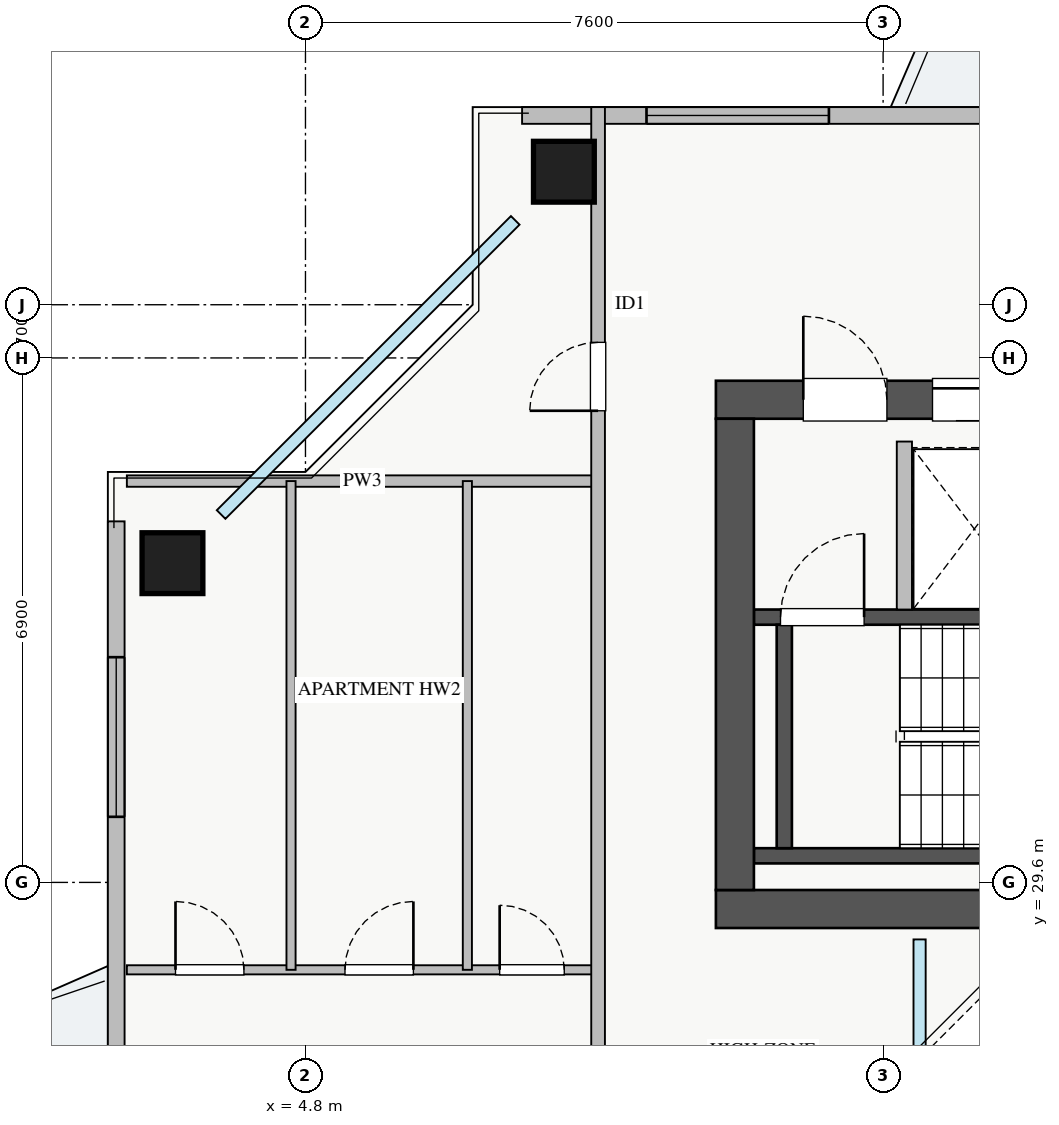
"""IFC4 building model, lengths in metres.
Left out: names, types, materials, properties, quantities, classifications, styles, units other than length and angle.
Written with IfcOpenShell. Run it as: python <this file> out.ifc"""

import sys

from ifc_helpers import new_model, si_unit, direction, frame, frame_2d, origin, origin_2d, place, context, subcontext, project, spatial, rectangle, extrude, source, transform, mapped, element, fill, save


model = new_model("IFC4")
c1 = context("Model", 3, precision=1e-05, world=origin(), true_north=direction((0.0, 1.0)))
c2 = subcontext(c1, "Body", "Model", "MODEL_VIEW")
j1 = project(units=[si_unit("LENGTHUNIT", "METRE"), si_unit("PLANEANGLEUNIT", "RADIAN")], contexts=[c1])
p1 = place(None, origin())
s1 = spatial("IfcSite", under=j1, at=p1, CompositionType="ELEMENT")
p2 = place(p1, origin())
s2 = spatial("IfcBuilding", under=s1, at=p2, CompositionType="ELEMENT")
p3 = place(p2, frame((0.0, 0.0, 190.5)))
s3 = spatial("IfcBuildingStorey", under=s2, at=p3, CompositionType="ELEMENT", Elevation=190.5)
p4 = place(p3, frame((12.68, 33.2, 0.0), z_axis=(0.0, 0.0, 1.0), x_axis=(1.0, 0.0, 0.0)))
e1 = element("IfcWall", 1, at=p4, inside=s3, PredefinedType="SHEAR", context=c2, shape_type="SweptSolid", body=[
    extrude(rectangle(XDim=1.94, YDim=0.18, at=frame_2d((0.97, 0.0))), origin(), (0.0, 0.0, 1.0), 3.07),
])
p5 = place(p3, frame((10.7, 29.95, 0.0), z_axis=(0.0, 0.0, 1.0), x_axis=(1.0, 0.0, 0.0)))
e2 = element("IfcWall", 2, at=p5, inside=s3, PredefinedType="SHEAR", context=c2, shape_type="SweptSolid", body=[
    extrude(rectangle(XDim=7.45, YDim=0.2, at=frame_2d((3.725, 0.0))), origin(), (0.0, 0.0, 1.0), 3.25),
])
p6 = place(p3, frame((10.7, 33.09, 0.0), z_axis=(0.0, 0.0, 1.0), x_axis=(1.0, 0.0, 0.0)))
e3 = element("IfcWall", 3, at=p6, inside=s3, PredefinedType="SHEAR", context=c2, shape_type="SweptSolid", body=[
    extrude(rectangle(XDim=7.45, YDim=0.2, at=frame_2d((3.725, 0.0))), origin(), (0.0, 0.0, 1.0), 3.25),
])
p7 = place(p6, frame((0.35, 0.0, 0.0)))
e4 = element("IfcOpeningElement", 4, at=p7, cuts=e3, PredefinedType="OPENING", context=c2, shape_type="SweptSolid", body=[
    extrude(rectangle(XDim=1.1, YDim=2.05, at=frame_2d((0.55, 1.025))), frame((0.0, 0.11, 0.0), z_axis=(0.0, -1.0, 0.0), x_axis=(1.0, 0.0, 0.0)), (0.0, 0.0, 1.0), 0.22),
])
p8 = place(p3, frame((11.1, 30.05, 0.0), z_axis=(0.0, 0.0, 1.0), x_axis=(0.0, 1.0, 0.0)))
e5 = element("IfcWall", 5, at=p8, inside=s3, PredefinedType="SHEAR", context=c2, shape_type="SweptSolid", body=[
    extrude(rectangle(XDim=2.94, YDim=0.2, at=frame_2d((1.47, 0.0))), origin(), (0.0, 0.0, 1.0), 3.25),
])
p9 = place(p3, frame((10.2, 29.25, 0.0), z_axis=(0.0, 0.0, 1.0), x_axis=(1.0, 0.0, 0.0)))
e6 = element("IfcWall", 6, at=p9, inside=s3, PredefinedType="SHEAR", context=c2, shape_type="SweptSolid", body=[
    extrude(rectangle(XDim=17.6, YDim=0.5, at=frame_2d((8.8, 0.0))), origin(), (0.0, 0.0, 1.0), 3.25),
])
p10 = place(p3, frame((10.2, 35.95, 0.0), z_axis=(0.0, 0.0, 1.0), x_axis=(1.0, 0.0, 0.0)))
e7 = element("IfcWall", 7, at=p10, inside=s3, PredefinedType="SHEAR", context=c2, shape_type="SweptSolid", body=[
    extrude(rectangle(XDim=17.6, YDim=0.5, at=frame_2d((8.8, 0.0))), origin(), (0.0, 0.0, 1.0), 3.25),
])
p11 = place(p10, frame((1.15, 0.0, 0.0)))
e8 = element("IfcOpeningElement", 8, at=p11, cuts=e7, PredefinedType="OPENING", context=c2, shape_type="SweptSolid", body=[
    extrude(rectangle(XDim=1.1, YDim=2.05, at=frame_2d((0.55, 1.025))), frame((0.0, 0.26, 0.0), z_axis=(0.0, -1.0, 0.0), x_axis=(1.0, 0.0, 0.0)), (0.0, 0.0, 1.0), 0.52),
])
p12 = place(p10, frame((8.3, 0.0, 0.0)))
e9 = element("IfcOpeningElement", 9, at=p12, cuts=e7, PredefinedType="OPENING", context=c2, shape_type="SweptSolid", body=[
    extrude(rectangle(XDim=1.1, YDim=2.05, at=frame_2d((0.55, 1.025))), frame((0.0, 0.26, 0.0), z_axis=(0.0, -1.0, 0.0), x_axis=(1.0, 0.0, 0.0)), (0.0, 0.0, 1.0), 0.52),
])
p13 = place(p10, frame((2.85, 0.0, 0.0)))
e10 = element("IfcOpeningElement", 10, at=p13, cuts=e7, PredefinedType="OPENING", context=c2, shape_type="SweptSolid", body=[
    extrude(rectangle(XDim=1.1, YDim=2.05, at=frame_2d((0.55, 1.025))), frame((0.0, 0.26, 0.0), z_axis=(0.0, -1.0, 0.0), x_axis=(1.0, 0.0, 0.0)), (0.0, 0.0, 1.0), 0.52),
])
p14 = place(p10, frame((5.8, 0.0, 0.0)))
e11 = element("IfcOpeningElement", 11, at=p14, cuts=e7, PredefinedType="OPENING", context=c2, shape_type="SweptSolid", body=[
    extrude(rectangle(XDim=1.0, YDim=2.05, at=frame_2d((0.5, 1.025))), frame((0.0, 0.26, 0.0), z_axis=(0.0, -1.0, 0.0), x_axis=(1.0, 0.0, 0.0)), (0.0, 0.0, 1.0), 0.52),
])
p15 = place(p10, frame((14.74, 0.0, 0.0)))
e12 = element("IfcOpeningElement", 12, at=p15, cuts=e7, PredefinedType="OPENING", context=c2, shape_type="SweptSolid", body=[
    extrude(rectangle(XDim=1.0, YDim=2.05, at=frame_2d((0.5, 1.025))), frame((0.0, 0.26, 0.0), z_axis=(0.0, -1.0, 0.0), x_axis=(1.0, 0.0, 0.0)), (0.0, 0.0, 1.0), 0.52),
])
p16 = place(p10, frame((10.25, 0.0, 0.0)))
e13 = element("IfcOpeningElement", 13, at=p16, cuts=e7, PredefinedType="OPENING", context=c2, shape_type="SweptSolid", body=[
    extrude(rectangle(XDim=1.0, YDim=2.05, at=frame_2d((0.5, 1.025))), frame((0.0, 0.26, 0.0), z_axis=(0.0, -1.0, 0.0), x_axis=(1.0, 0.0, 0.0)), (0.0, 0.0, 1.0), 0.52),
])
p17 = place(p10, frame((12.7, 0.0, 0.0)))
e14 = element("IfcOpeningElement", 14, at=p17, cuts=e7, PredefinedType="OPENING", context=c2, shape_type="SweptSolid", body=[
    extrude(rectangle(XDim=1.0, YDim=2.05, at=frame_2d((0.5, 1.025))), frame((0.0, 0.26, 0.0), z_axis=(0.0, -1.0, 0.0), x_axis=(1.0, 0.0, 0.0)), (0.0, 0.0, 1.0), 0.52),
])
p18 = place(p3, frame((10.45, 29.5, 0.0), z_axis=(0.0, 0.0, 1.0), x_axis=(0.0, 1.0, 0.0)))
e15 = element("IfcWall", 15, at=p18, inside=s3, PredefinedType="SHEAR", context=c2, shape_type="SweptSolid", body=[
    extrude(rectangle(XDim=6.2, YDim=0.5, at=frame_2d((3.1, 0.0))), origin(), (0.0, 0.0, 1.0), 3.25),
])
m1 = source(origin(), c2, "Body", "SweptSolid", [
    extrude(rectangle(XDim=0.8, YDim=0.8, at=origin_2d()), origin(), (0.0, 0.0, 1.0), 3.25),
])
for number, where, z_axis, x_axis in (
    (16, (8.2, 38.95, 0.0), (0.0, 0.0, 1.0), (1.0, 0.0, 0.0)),
    (17, (3.05, 33.8, 0.0), (0.0, 0.0, 1.0), (1.0, 0.0, 0.0)),
):
    element("IfcColumn", number, at=place(p3, frame(where, z_axis=z_axis, x_axis=x_axis)), inside=s3, PredefinedType="COLUMN", context=c2, shape_type="MappedRepresentation", body=[
        mapped(m1, transform((0.0, 0.0, 0.0), x_axis=(1.0, 0.0, 0.0), y_axis=(0.0, 1.0, 0.0), z_axis=(0.0, 0.0, 1.0), scale=1.0)),
    ])
p19 = place(p3, frame((7.65, 39.69, 0.0), z_axis=(0.0, 0.0, 1.0), x_axis=(1.0, 0.0, 0.0)))
e18 = element("IfcWall", 18, at=p19, inside=s3, PredefinedType="STANDARD", context=c2, shape_type="SweptSolid", body=[
    extrude(rectangle(XDim=22.7, YDim=0.22, at=frame_2d((11.35, 0.0))), origin(), (0.0, 0.0, 1.0), 2.61),
])
p20 = place(p19, frame((12.2, 0.0, 0.0)))
e19 = element("IfcOpeningElement", 19, at=p20, cuts=e18, PredefinedType="OPENING", context=c2, shape_type="SweptSolid", body=[
    extrude(rectangle(XDim=1.2, YDim=2.1, at=frame_2d((0.6, 1.05))), frame((0.0, 0.12, 0.0), z_axis=(0.0, -1.0, 0.0), x_axis=(1.0, 0.0, 0.0)), (0.0, 0.0, 1.0), 0.24),
])
p21 = place(p19, frame((1.637, 0.0, 0.9)))
e20 = element("IfcOpeningElement", 20, at=p21, cuts=e18, PredefinedType="OPENING", context=c2, shape_type="SweptSolid", body=[
    extrude(rectangle(XDim=2.4, YDim=1.48, at=frame_2d((1.2, 0.74))), frame((0.0, 0.12, 0.0), z_axis=(0.0, -1.0, 0.0), x_axis=(1.0, 0.0, 0.0)), (0.0, 0.0, 1.0), 0.24),
])
p22 = place(p19, frame((7.612, 0.0, 0.9)))
e21 = element("IfcOpeningElement", 21, at=p22, cuts=e18, PredefinedType="OPENING", context=c2, shape_type="SweptSolid", body=[
    extrude(rectangle(XDim=1.8, YDim=1.45, at=frame_2d((0.9, 0.725))), frame((0.0, 0.12, 0.0), z_axis=(0.0, -1.0, 0.0), x_axis=(1.0, 0.0, 0.0)), (0.0, 0.0, 1.0), 0.24),
])
p23 = place(p19, frame((18.812, 0.0, 0.9)))
e22 = element("IfcOpeningElement", 22, at=p23, cuts=e18, PredefinedType="OPENING", context=c2, shape_type="SweptSolid", body=[
    extrude(rectangle(XDim=2.1, YDim=1.48, at=frame_2d((1.05, 0.74))), frame((0.0, 0.12, 0.0), z_axis=(0.0, -1.0, 0.0), x_axis=(1.0, 0.0, 0.0)), (0.0, 0.0, 1.0), 0.24),
])
p24 = place(p3, frame((2.31, 11.65, 0.0), z_axis=(0.0, 0.0, 1.0), x_axis=(0.0, 1.0, 0.0)))
e23 = element("IfcWall", 23, at=p24, inside=s3, PredefinedType="STANDARD", context=c2, shape_type="SweptSolid", body=[
    extrude(rectangle(XDim=22.7, YDim=0.22, at=frame_2d((11.35, 0.0))), origin(), (0.0, 0.0, 1.0), 2.61),
])
p25 = place(p24, frame((12.2, 0.0, 0.0)))
e24 = element("IfcOpeningElement", 24, at=p25, cuts=e23, PredefinedType="OPENING", context=c2, shape_type="SweptSolid", body=[
    extrude(rectangle(XDim=1.2, YDim=2.1, at=frame_2d((0.6, 1.05))), frame((0.0, 0.12, 0.0), z_axis=(0.0, -1.0, 0.0), x_axis=(1.0, 0.0, 0.0)), (0.0, 0.0, 1.0), 0.24),
])
p26 = place(p24, frame((1.638, 0.0, 0.9)))
e25 = element("IfcOpeningElement", 25, at=p26, cuts=e23, PredefinedType="OPENING", context=c2, shape_type="SweptSolid", body=[
    extrude(rectangle(XDim=2.4, YDim=1.48, at=frame_2d((1.2, 0.74))), frame((0.0, 0.12, 0.0), z_axis=(0.0, -1.0, 0.0), x_axis=(1.0, 0.0, 0.0)), (0.0, 0.0, 1.0), 0.24),
])
p27 = place(p24, frame((18.813, 0.0, 0.9)))
e26 = element("IfcOpeningElement", 26, at=p27, cuts=e23, PredefinedType="OPENING", context=c2, shape_type="SweptSolid", body=[
    extrude(rectangle(XDim=2.1, YDim=1.48, at=frame_2d((1.05, 0.74))), frame((0.0, 0.12, 0.0), z_axis=(0.0, -1.0, 0.0), x_axis=(1.0, 0.0, 0.0)), (0.0, 0.0, 1.0), 0.24),
])
p28 = place(p24, frame((5.16, 0.0, 0.9)))
e27 = element("IfcOpeningElement", 27, at=p28, cuts=e23, PredefinedType="OPENING", context=c2, shape_type="SweptSolid", body=[
    extrude(rectangle(XDim=0.9, YDim=1.2, at=frame_2d((0.45, 0.6))), frame((0.0, 0.12, 0.0), z_axis=(0.0, -1.0, 0.0), x_axis=(1.0, 0.0, 0.0)), (0.0, 0.0, 1.0), 0.24),
])
p29 = place(p24, frame((13.62, 0.0, 0.9)))
e28 = element("IfcOpeningElement", 28, at=p29, cuts=e23, PredefinedType="OPENING", context=c2, shape_type="SweptSolid", body=[
    extrude(rectangle(XDim=0.9, YDim=1.2, at=frame_2d((0.45, 0.6))), frame((0.0, 0.12, 0.0), z_axis=(0.0, -1.0, 0.0), x_axis=(1.0, 0.0, 0.0)), (0.0, 0.0, 1.0), 0.24),
])
p30 = place(p3, frame((12.68, 33.19, 0.0), z_axis=(0.0, 0.0, 1.0), x_axis=(0.0, 1.0, 0.0)))
e29 = element("IfcWall", 29, at=p30, inside=s3, PredefinedType="PARTITIONING", context=c2, shape_type="SweptSolid", body=[
    extrude(rectangle(XDim=2.21, YDim=0.2, at=frame_2d((1.105, 0.0))), origin(), (0.0, 0.0, 1.0), 3.07),
])
p31 = place(p3, frame((2.45, 34.88, 0.0), z_axis=(0.0, 0.0, 1.0), x_axis=(1.0, 0.0, 0.0)))
e30 = element("IfcWall", 30, at=p31, inside=s3, PredefinedType="PARTITIONING", context=c2, shape_type="SweptSolid", body=[
    extrude(rectangle(XDim=6.2, YDim=0.15, at=frame_2d((3.1, 0.0))), origin(), (0.0, 0.0, 1.0), 3.07),
])
p32 = place(p3, frame((2.45, 28.45, 0.0), z_axis=(0.0, 0.0, 1.0), x_axis=(1.0, 0.0, 0.0)))
e31 = element("IfcWall", 31, at=p32, inside=s3, PredefinedType="PLUMBINGWALL", context=c2, shape_type="SweptSolid", body=[
    extrude(rectangle(XDim=6.2, YDim=0.12, at=frame_2d((3.1, 0.0))), origin(), (0.0, 0.0, 1.0), 3.07),
])
p33 = place(p32, frame((0.64, 0.0, 0.0)))
e32 = element("IfcOpeningElement", 32, at=p33, cuts=e31, PredefinedType="OPENING", context=c2, shape_type="SweptSolid", body=[
    extrude(rectangle(XDim=0.9, YDim=2.05, at=frame_2d((0.45, 1.025))), frame((0.0, 0.07, 0.0), z_axis=(0.0, -1.0, 0.0), x_axis=(1.0, 0.0, 0.0)), (0.0, 0.0, 1.0), 0.14),
])
p34 = place(p32, frame((2.87, 0.0, 0.0)))
e33 = element("IfcOpeningElement", 33, at=p34, cuts=e31, PredefinedType="OPENING", context=c2, shape_type="SweptSolid", body=[
    extrude(rectangle(XDim=0.9, YDim=2.05, at=frame_2d((0.45, 1.025))), frame((0.0, 0.07, 0.0), z_axis=(0.0, -1.0, 0.0), x_axis=(1.0, 0.0, 0.0)), (0.0, 0.0, 1.0), 0.14),
])
p35 = place(p32, frame((4.905, 0.0, 0.0)))
e34 = element("IfcOpeningElement", 34, at=p35, cuts=e31, PredefinedType="OPENING", context=c2, shape_type="SweptSolid", body=[
    extrude(rectangle(XDim=0.85, YDim=2.05, at=frame_2d((0.425, 1.025))), frame((0.0, 0.07, 0.0), z_axis=(0.0, -1.0, 0.0), x_axis=(1.0, 0.0, 0.0)), (0.0, 0.0, 1.0), 0.14),
])
for number, where, z_axis, x_axis in (
    (35, (4.61, 28.45, 0.0), (0.0, 0.0, 1.0), (0.0, 1.0, 0.0)),
    (36, (6.93, 28.45, 0.0), (0.0, 0.0, 1.0), (0.0, 1.0, 0.0)),
):
    element("IfcWall", number, at=place(p3, frame(where, z_axis=z_axis, x_axis=x_axis)), inside=s3, PredefinedType="PLUMBINGWALL", context=c2, shape_type="SweptSolid", body=[
        extrude(rectangle(XDim=6.43, YDim=0.12, at=frame_2d((3.215, 0.0))), origin(), (0.0, 0.0, 1.0), 3.07),
    ])
p36 = place(p3, frame((8.65, 6.2, 0.0), z_axis=(0.0, 0.0, 1.0), x_axis=(0.0, 1.0, 0.0)))
e37 = element("IfcWall", 37, at=p36, inside=s3, PredefinedType="PARTITIONING", context=c2, shape_type="SweptSolid", body=[
    extrude(rectangle(XDim=33.6, YDim=0.18, at=frame_2d((16.8, 0.0))), origin(), (0.0, 0.0, 1.0), 3.07),
])
p37 = place(p36, frame((29.605, 0.0, 0.0)))
e38 = element("IfcOpeningElement", 38, at=p37, cuts=e37, PredefinedType="OPENING", context=c2, shape_type="SweptSolid", body=[
    extrude(rectangle(XDim=0.9, YDim=2.05, at=frame_2d((0.45, 1.025))), frame((0.0, 0.1, 0.0), z_axis=(0.0, -1.0, 0.0), x_axis=(1.0, 0.0, 0.0)), (0.0, 0.0, 1.0), 0.2),
])
p38 = place(p36, frame((2.92, 0.0, 0.0)))
e39 = element("IfcOpeningElement", 39, at=p38, cuts=e37, PredefinedType="OPENING", context=c2, shape_type="SweptSolid", body=[
    extrude(rectangle(XDim=0.9, YDim=2.05, at=frame_2d((0.45, 1.025))), frame((0.0, 0.1, 0.0), z_axis=(0.0, -1.0, 0.0), x_axis=(1.0, 0.0, 0.0)), (0.0, 0.0, 1.0), 0.2),
])
p39 = place(p36, frame((6.965, 0.0, 0.0)))
e40 = element("IfcOpeningElement", 40, at=p39, cuts=e37, PredefinedType="OPENING", context=c2, shape_type="SweptSolid", body=[
    extrude(rectangle(XDim=1.0, YDim=2.05, at=frame_2d((0.5, 1.025))), frame((0.0, 0.1, 0.0), z_axis=(0.0, -1.0, 0.0), x_axis=(1.0, 0.0, 0.0)), (0.0, 0.0, 1.0), 0.2),
])
p40 = place(p36, frame((18.595, 0.0, 0.0)))
e41 = element("IfcOpeningElement", 41, at=p40, cuts=e37, PredefinedType="OPENING", context=c2, shape_type="SweptSolid", body=[
    extrude(rectangle(XDim=1.0, YDim=2.05, at=frame_2d((0.5, 1.025))), frame((0.0, 0.1, 0.0), z_axis=(0.0, -1.0, 0.0), x_axis=(1.0, 0.0, 0.0)), (0.0, 0.0, 1.0), 0.2),
])
m2 = source(origin(), c2, "Body", "SweptSolid", [
    extrude(rectangle(XDim=2.4, YDim=1.48, at=frame_2d((1.2, 0.74))), frame((0.0, 0.03, 0.0), z_axis=(0.0, -1.0, 0.0), x_axis=(1.0, 0.0, 0.0)), (0.0, 0.0, 1.0), 0.06),
])
p41 = place(p21, origin())
e42 = element("IfcWindow", 42, at=p41, inside=s3, PartitioningType="TRIPLE_PANEL_VERTICAL", PredefinedType="WINDOW", context=c2, shape_type="MappedRepresentation", body=[
    mapped(m2, transform((0.0, 0.0, 0.0), x_axis=(1.0, 0.0, 0.0), y_axis=(0.0, 1.0, 0.0), z_axis=(0.0, 0.0, 1.0), scale=1.0)),
])
fill(e20, e42)
m3 = source(origin(), c2, "Body", "SweptSolid", [
    extrude(rectangle(XDim=2.1, YDim=1.48, at=frame_2d((1.05, 0.74))), frame((0.0, 0.03, 0.0), z_axis=(0.0, -1.0, 0.0), x_axis=(1.0, 0.0, 0.0)), (0.0, 0.0, 1.0), 0.06),
])
p42 = place(p27, origin())
e43 = element("IfcWindow", 43, at=p42, inside=s3, PartitioningType="TRIPLE_PANEL_VERTICAL", PredefinedType="WINDOW", context=c2, shape_type="MappedRepresentation", body=[
    mapped(m3, transform((0.0, 0.0, 0.0), x_axis=(1.0, 0.0, 0.0), y_axis=(0.0, 1.0, 0.0), z_axis=(0.0, 0.0, 1.0), scale=1.0)),
])
fill(e26, e43)
m4 = source(origin(), c2, "Body", "SweptSolid", [
    extrude(rectangle(XDim=1.1, YDim=2.05, at=frame_2d((0.55, 1.025))), frame((0.0, 0.025, 0.0), z_axis=(0.0, -1.0, 0.0), x_axis=(1.0, 0.0, 0.0)), (0.0, 0.0, 1.0), 0.05),
])
p43 = place(p11, origin())
e44 = element("IfcDoor", 44, at=p43, inside=s3, OperationType="SINGLE_SWING_LEFT", PredefinedType="DOOR", context=c2, shape_type="MappedRepresentation", body=[
    mapped(m4, transform((0.0, 0.0, 0.0), x_axis=(1.0, 0.0, 0.0), y_axis=(0.0, 1.0, 0.0), z_axis=(0.0, 0.0, 1.0), scale=1.0)),
])
fill(e8, e44)
p44 = place(p7, origin())
e45 = element("IfcDoor", 45, at=p44, inside=s3, OperationType="SINGLE_SWING_RIGHT", PredefinedType="DOOR", context=c2, shape_type="MappedRepresentation", body=[
    mapped(m4, transform((0.0, 0.0, 0.0), x_axis=(1.0, 0.0, 0.0), y_axis=(0.0, 1.0, 0.0), z_axis=(0.0, 0.0, 1.0), scale=1.0)),
])
fill(e4, e45)
p45 = place(p13, origin())
e46 = element("IfcDoor", 46, at=p45, inside=s3, OperationType="SLIDING_TO_LEFT", PredefinedType="DOOR", context=c2, shape_type="MappedRepresentation", body=[
    mapped(m4, transform((0.0, 0.0, 0.0), x_axis=(1.0, 0.0, 0.0), y_axis=(0.0, 1.0, 0.0), z_axis=(0.0, 0.0, 1.0), scale=1.0)),
])
fill(e10, e46)
m5 = source(origin(), c2, "Body", "SweptSolid", [
    extrude(rectangle(XDim=0.9, YDim=2.05, at=frame_2d((0.45, 1.025))), frame((0.0, 0.025, 0.0), z_axis=(0.0, -1.0, 0.0), x_axis=(1.0, 0.0, 0.0)), (0.0, 0.0, 1.0), 0.05),
])
p46 = place(p33, origin())
e47 = element("IfcDoor", 47, at=p46, inside=s3, OperationType="SINGLE_SWING_LEFT", PredefinedType="DOOR", context=c2, shape_type="MappedRepresentation", body=[
    mapped(m5, transform((0.0, 0.0, 0.0), x_axis=(1.0, 0.0, 0.0), y_axis=(0.0, 1.0, 0.0), z_axis=(0.0, 0.0, 1.0), scale=1.0)),
])
fill(e32, e47)
p47 = place(p34, origin())
e48 = element("IfcDoor", 48, at=p47, inside=s3, OperationType="SINGLE_SWING_RIGHT", PredefinedType="DOOR", context=c2, shape_type="MappedRepresentation", body=[
    mapped(m5, transform((0.0, 0.0, 0.0), x_axis=(1.0, 0.0, 0.0), y_axis=(0.0, 1.0, 0.0), z_axis=(0.0, 0.0, 1.0), scale=1.0)),
])
fill(e33, e48)
m6 = source(origin(), c2, "Body", "SweptSolid", [
    extrude(rectangle(XDim=0.85, YDim=2.05, at=frame_2d((0.425, 1.025))), frame((0.0, 0.025, 0.0), z_axis=(0.0, -1.0, 0.0), x_axis=(1.0, 0.0, 0.0)), (0.0, 0.0, 1.0), 0.05),
])
p48 = place(p35, origin())
e49 = element("IfcDoor", 49, at=p48, inside=s3, OperationType="SINGLE_SWING_LEFT", PredefinedType="DOOR", context=c2, shape_type="MappedRepresentation", body=[
    mapped(m6, transform((0.0, 0.0, 0.0), x_axis=(1.0, 0.0, 0.0), y_axis=(0.0, 1.0, 0.0), z_axis=(0.0, 0.0, 1.0), scale=1.0)),
])
fill(e34, e49)
p49 = place(p37, origin())
e50 = element("IfcDoor", 50, at=p49, inside=s3, OperationType="SINGLE_SWING_LEFT", PredefinedType="DOOR", context=c2, shape_type="MappedRepresentation", body=[
    mapped(m5, transform((0.0, 0.0, 0.0), x_axis=(1.0, 0.0, 0.0), y_axis=(0.0, 1.0, 0.0), z_axis=(0.0, 0.0, 1.0), scale=1.0)),
])
fill(e38, e50)
save(model, sys.argv[1])
